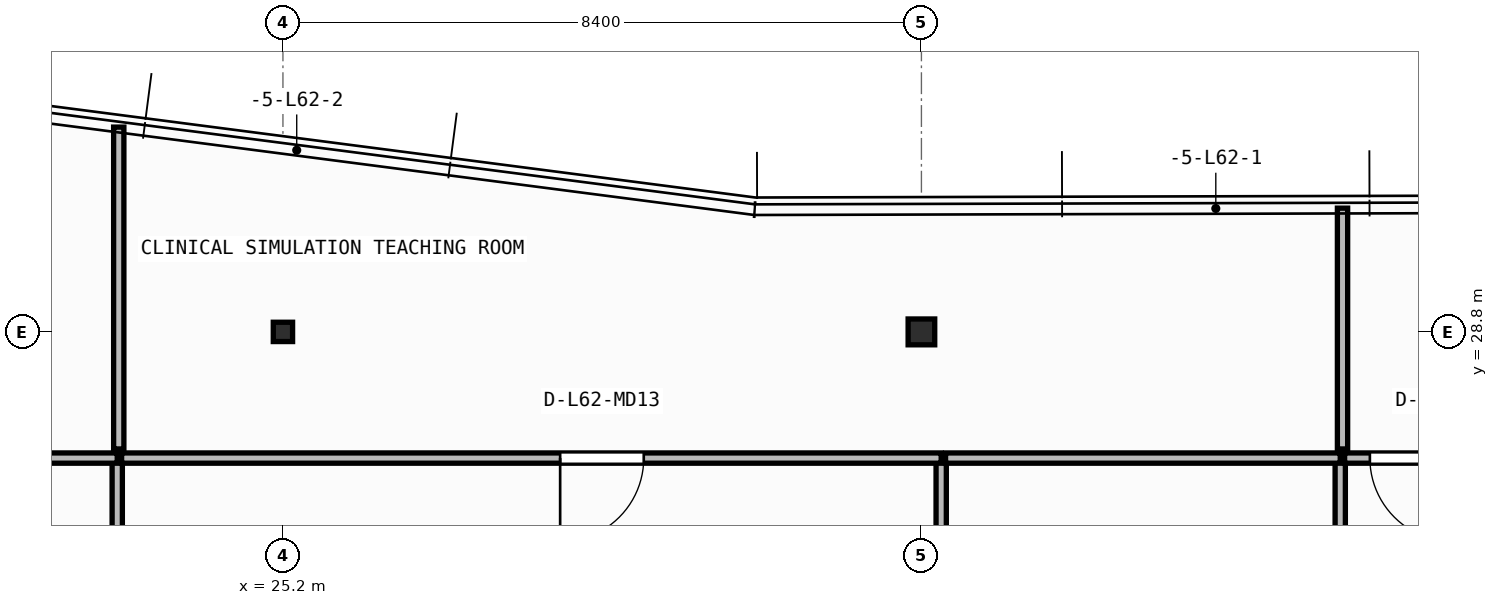
"""IFC4 building model, lengths in metres.
Left out: names, types, materials, properties, quantities, classifications, styles, units other than length and angle.
Written with IfcOpenShell. Run it as: python <this file> out.ifc"""

import sys

from ifc_helpers import new_model, si_unit, direction, frame, frame_2d, origin, origin_2d, place, context, subcontext, project, spatial, rectangle, i_section, extrude, element, fill, save


model = new_model("IFC4")
c1 = context("Model", 3, precision=1e-05, world=origin(), true_north=direction((0.0, 1.0)))
c2 = subcontext(c1, "Body", "Model", "MODEL_VIEW")
j1 = project(units=[si_unit("LENGTHUNIT", "METRE"), si_unit("PLANEANGLEUNIT", "RADIAN")], contexts=[c1])
p1 = place(None, origin())
s1 = spatial("IfcSite", under=j1, at=p1, CompositionType="ELEMENT")
p2 = place(p1, origin())
s2 = spatial("IfcBuilding", under=s1, at=p2, CompositionType="ELEMENT")
p3 = place(p2, frame((0.0, 0.0, 252.6)))
s3 = spatial("IfcBuildingStorey", under=s2, at=p3, CompositionType="ELEMENT", Elevation=252.6)
p4 = place(p3, frame((25.2, 28.8, 0.0), z_axis=(0.0, 0.0, 1.0), x_axis=(1.0, 0.0, 0.0)))
e1 = element("IfcColumn", 1, at=p4, inside=s3, PredefinedType="COLUMN", context=c2, shape_type="SweptSolid", body=[
    extrude(i_section(OverallWidth=0.254, OverallDepth=0.254, WebThickness=0.009, FlangeThickness=0.014, FilletRadius=0.013, at=origin_2d()), origin(), (0.0, 0.0, 1.0), 3.95),
])
p5 = place(p3, frame((33.6, 28.8, 0.0), z_axis=(0.0, 0.0, 1.0), x_axis=(1.0, 0.0, 0.0)))
e2 = element("IfcColumn", 2, at=p5, inside=s3, PredefinedType="COLUMN", context=c2, shape_type="SweptSolid", body=[
    extrude(i_section(OverallWidth=0.35, OverallDepth=0.34, WebThickness=0.016, FlangeThickness=0.028, at=origin_2d()), origin(), (0.0, 0.0, 1.0), 3.95),
])
p6 = place(p3, frame((23.02, 20.847, 0.0), z_axis=(0.0, 0.0, 1.0), x_axis=(0.0, 1.0, 0.0)))
e3 = element("IfcWall", 3, at=p6, inside=s3, PredefinedType="PARTITIONING", context=c2, shape_type="SweptSolid", body=[
    extrude(rectangle(XDim=6.292, YDim=0.135, at=frame_2d((3.146, 0.0))), origin(), (0.0, 0.0, 1.0), 3.71),
])
p7 = place(p3, frame((23.02, 27.14, 0.0), z_axis=(0.0, 0.0, 1.0), x_axis=(-1.0, 0.0, 0.0)))
e4 = element("IfcWall", 4, at=p7, inside=s3, PredefinedType="PARTITIONING", context=c2, shape_type="SweptSolid", body=[
    extrude(rectangle(XDim=9.24, YDim=0.135, at=frame_2d((4.62, 0.0))), origin(), (0.0, 0.0, 1.0), 3.71),
])
p8 = place(p3, frame((33.86, 20.847, 0.0), z_axis=(0.0, 0.0, 1.0), x_axis=(0.0, 1.0, 0.0)))
e5 = element("IfcWall", 5, at=p8, inside=s3, PredefinedType="PARTITIONING", context=c2, shape_type="SweptSolid", body=[
    extrude(rectangle(XDim=6.292, YDim=0.135, at=frame_2d((3.146, 0.0))), origin(), (0.0, 0.0, 1.0), 3.157),
])
p9 = place(p3, frame((33.86, 27.14, 0.0), z_axis=(0.0, 0.0, 1.0), x_axis=(-1.0, 0.0, 0.0)))
e6 = element("IfcWall", 6, at=p9, inside=s3, PredefinedType="PARTITIONING", context=c2, shape_type="SweptSolid", body=[
    extrude(rectangle(XDim=10.783, YDim=0.135, at=frame_2d((5.391, 0.0))), origin(), (0.0, 0.0, 1.0), 3.71),
])
p10 = place(p9, frame((3.913, 0.0, 0.0)))
e7 = element("IfcOpeningElement", 7, at=p10, cuts=e6, PredefinedType="OPENING", context=c2, shape_type="SweptSolid", body=[
    extrude(rectangle(XDim=1.1, YDim=2.1, at=frame_2d((0.55, 1.05))), frame((0.0, 0.077, 0.0), z_axis=(0.0, -1.0, 0.0), x_axis=(1.0, 0.0, 0.0)), (0.0, 0.0, 1.0), 0.155),
])
p11 = place(p3, frame((39.11, 20.847, 0.0), z_axis=(0.0, 0.0, 1.0), x_axis=(0.0, 1.0, 0.0)))
e8 = element("IfcWall", 8, at=p11, inside=s3, PredefinedType="PARTITIONING", context=c2, shape_type="SweptSolid", body=[
    extrude(rectangle(XDim=6.292, YDim=0.135, at=frame_2d((3.146, 0.0))), origin(), (0.0, 0.0, 1.0), 3.71),
])
p12 = place(p3, frame((39.11, 27.14, 0.0), z_axis=(0.0, 0.0, 1.0), x_axis=(-1.0, 0.0, 0.0)))
e9 = element("IfcWall", 9, at=p12, inside=s3, PredefinedType="PARTITIONING", context=c2, shape_type="SweptSolid", body=[
    extrude(rectangle(XDim=5.193, YDim=0.135, at=frame_2d((2.596, 0.0))), origin(), (0.0, 0.0, 1.0), 3.71),
])
p13 = place(p3, frame((45.96, 27.14, 0.0), z_axis=(0.0, 0.0, 1.0), x_axis=(-1.0, 0.0, 0.0)))
e10 = element("IfcWall", 10, at=p13, inside=s3, PredefinedType="PARTITIONING", context=c2, shape_type="SweptSolid", body=[
    extrude(rectangle(XDim=6.792, YDim=0.135, at=frame_2d((3.396, 0.0))), origin(), (0.0, 0.0, 1.0), 3.71),
])
p14 = place(p13, frame((5.36, 0.0, 0.0)))
e11 = element("IfcOpeningElement", 11, at=p14, cuts=e10, PredefinedType="OPENING", context=c2, shape_type="SweptSolid", body=[
    extrude(rectangle(XDim=1.1, YDim=2.1, at=frame_2d((0.55, 1.05))), frame((0.0, 0.077, 0.0), z_axis=(0.0, -1.0, 0.0), x_axis=(1.0, 0.0, 0.0)), (0.0, 0.0, 1.0), 0.155),
])
p15 = place(p3, frame((23.04, 27.26, 0.0), z_axis=(0.0, 0.0, 1.0), x_axis=(0.0, 1.0, 0.0)))
e12 = element("IfcWall", 12, at=p15, inside=s3, PredefinedType="PARTITIONING", context=c2, shape_type="SweptSolid", body=[
    extrude(rectangle(XDim=4.234, YDim=0.135, at=frame_2d((2.117, 0.0))), origin(), (0.0, 0.0, 1.0), 3.71),
])
p16 = place(p3, frame((39.14, 27.26, 0.0), z_axis=(0.0, 0.0, 1.0), x_axis=(0.0, 1.0, 0.0)))
e13 = element("IfcWall", 13, at=p16, inside=s3, PredefinedType="PARTITIONING", context=c2, shape_type="SweptSolid", body=[
    extrude(rectangle(XDim=3.168, YDim=0.135, at=frame_2d((1.584, 0.0))), origin(), (0.0, 0.0, 1.0), 3.71),
])
p17 = place(p10, origin())
e14 = element("IfcDoor", 14, at=p17, inside=s3, OperationType="SINGLE_SWING_RIGHT", PredefinedType="DOOR", context=c2, shape_type="SweptSolid", body=[
    extrude(rectangle(XDim=1.1, YDim=2.1, at=frame_2d((0.55, 1.05))), frame((0.0, 0.025, 0.0), z_axis=(0.0, -1.0, 0.0), x_axis=(1.0, 0.0, 0.0)), (0.0, 0.0, 1.0), 0.05),
])
fill(e7, e14)
p18 = place(p14, origin())
e15 = element("IfcDoor", 15, at=p18, inside=s3, OperationType="SINGLE_SWING_LEFT", PredefinedType="DOOR", context=c2, shape_type="SweptSolid", body=[
    extrude(rectangle(XDim=1.1, YDim=2.1, at=frame_2d((0.55, 1.05))), frame((0.0, 0.025, 0.0), z_axis=(0.0, -1.0, 0.0), x_axis=(1.0, 0.0, 0.0)), (0.0, 0.0, 1.0), 0.05),
])
fill(e11, e15)
save(model, sys.argv[1])
